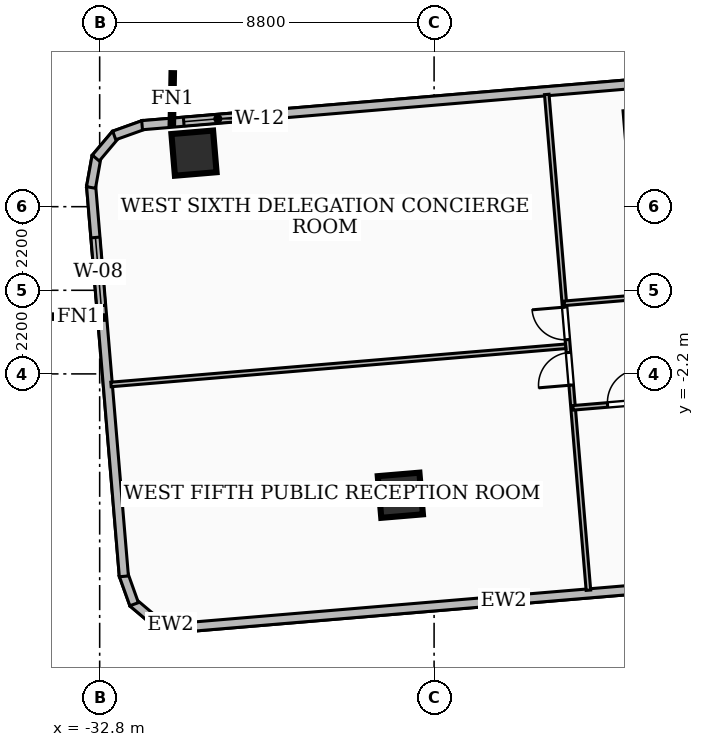
"""IFC4 building model, lengths in metres.
Left out: names, types, materials, properties, quantities, classifications, styles, units other than length and angle.
Written with IfcOpenShell. Run it as: python <this file> out.ifc"""

import sys

from ifc_helpers import new_model, si_unit, direction, frame, frame_2d, origin, origin_2d, place, context, subcontext, project, spatial, rectangle, extrude, element, fill, save


model = new_model("IFC4")
c1 = context("Model", 3, precision=1e-05, world=origin(), true_north=direction((0.0, 1.0)))
c2 = subcontext(c1, "Body", "Model", "MODEL_VIEW")
j1 = project(units=[si_unit("LENGTHUNIT", "METRE"), si_unit("PLANEANGLEUNIT", "RADIAN")], contexts=[c1])
p1 = place(None, origin())
s1 = spatial("IfcSite", under=j1, at=p1, CompositionType="ELEMENT")
p2 = place(p1, origin())
s2 = spatial("IfcBuilding", under=s1, at=p2, CompositionType="ELEMENT")
p3 = place(p2, frame((0.0, 0.0, 64.08)))
s3 = spatial("IfcBuildingStorey", under=s2, at=p3, CompositionType="ELEMENT", Elevation=64.08)
for number, where, z_axis, x_axis in (
    (1, (-30.318, 3.609, 0.0), (0.0, 0.0, 1.0), (0.996, 0.084, 0.0)),
    (2, (-24.888, -5.393, 0.0), (0.0, 0.0, 1.0), (0.996, 0.084, 0.0)),
):
    element("IfcColumn", number, at=place(p3, frame(where, z_axis=z_axis, x_axis=x_axis)), inside=s3, PredefinedType="COLUMN", context=c2, shape_type="SweptSolid", body=[
        extrude(rectangle(XDim=1.1, YDim=1.1, at=origin_2d()), origin(), (0.0, 0.0, 1.0), 3.6),
    ])
p4 = place(p3, frame((-13.758, -7.458, 0.0), z_axis=(0.0, 0.0, 1.0), x_axis=(-0.996498704409, -0.083608205999, 0.0)))
e3 = element("IfcWall", 3, at=p4, inside=s3, PredefinedType="SOLIDWALL", context=c2, shape_type="SweptSolid", body=[
    extrude(rectangle(XDim=16.875, YDim=0.24, at=frame_2d((8.438, 0.0))), origin(), (0.0, 0.0, 1.0), 2.072),
])
p5 = place(p3, frame((-30.524, -8.871, 0.0), z_axis=(0.0, 0.0, 1.0), x_axis=(-0.98444754165, 0.175678791378, 0.0)))
e4 = element("IfcWall", 4, at=p5, inside=s3, PredefinedType="SOLIDWALL", context=c2, shape_type="SweptSolid", body=[
    extrude(rectangle(XDim=0.831, YDim=0.24, at=frame_2d((0.416, 0.0))), origin(), (0.0, 0.0, 1.0), 3.34),
])
p6 = place(p3, frame((-31.298, -8.745, 0.0), z_axis=(0.0, 0.0, 1.0), x_axis=(-0.764000342655, 0.645215837083, 0.0)))
e5 = element("IfcWall", 5, at=p6, inside=s3, PredefinedType="SOLIDWALL", context=c2, shape_type="SweptSolid", body=[
    extrude(rectangle(XDim=0.814, YDim=0.24, at=frame_2d((0.407, 0.0))), origin(), (0.0, 0.0, 1.0), 3.34),
])
p7 = place(p3, frame((-31.893, -8.26, 0.0), z_axis=(0.0, 0.0, 1.0), x_axis=(-0.337136933599, 0.941455621898, 0.0)))
e6 = element("IfcWall", 6, at=p7, inside=s3, PredefinedType="SOLIDWALL", context=c2, shape_type="SweptSolid", body=[
    extrude(rectangle(XDim=0.831, YDim=0.24, at=frame_2d((0.415, 0.0))), origin(), (0.0, 0.0, 1.0), 3.34),
])
p8 = place(p3, frame((-32.163, -7.527, 0.0), z_axis=(0.0, 0.0, 1.0), x_axis=(-0.083619213047, 0.996497780835, 0.0)))
e7 = element("IfcWall", 7, at=p8, inside=s3, PredefinedType="SOLIDWALL", context=c2, shape_type="SweptSolid", body=[
    extrude(rectangle(XDim=10.318, YDim=0.24, at=frame_2d((5.159, 0.0))), origin(), (0.0, 0.0, 1.0), 3.34),
])
p9 = place(p8, frame((7.148, 0.0, 0.85)))
e8 = element("IfcOpeningElement", 8, at=p9, cuts=e7, PredefinedType="OPENING", context=c2, shape_type="SweptSolid", body=[
    extrude(rectangle(XDim=1.8, YDim=1.8, at=frame_2d((0.9, 0.9))), frame((0.0, 0.13, 0.0), z_axis=(0.0, -1.0, 0.0), x_axis=(1.0, 0.0, 0.0)), (0.0, 0.0, 1.0), 0.26),
])
p10 = place(p3, frame((-33.028, 2.705, 0.0), z_axis=(0.0, 0.0, 1.0), x_axis=(0.175729613604, 0.984438470857, 0.0)))
e9 = element("IfcWall", 9, at=p10, inside=s3, PredefinedType="SOLIDWALL", context=c2, shape_type="SweptSolid", body=[
    extrude(rectangle(XDim=0.831, YDim=0.24, at=frame_2d((0.416, 0.0))), origin(), (0.0, 0.0, 1.0), 3.34),
])
p11 = place(p3, frame((-32.902, 3.479, 0.0), z_axis=(0.0, 0.0, 1.0), x_axis=(0.645067994637, 0.764125174494, 0.0)))
e10 = element("IfcWall", 10, at=p11, inside=s3, PredefinedType="SOLIDWALL", context=c2, shape_type="SweptSolid", body=[
    extrude(rectangle(XDim=0.814, YDim=0.24, at=frame_2d((0.407, 0.0))), origin(), (0.0, 0.0, 1.0), 3.34),
])
p12 = place(p3, frame((-32.417, 4.074, 0.0), z_axis=(0.0, 0.0, 1.0), x_axis=(0.941455621898, 0.337136933599, 0.0)))
e11 = element("IfcWall", 11, at=p12, inside=s3, PredefinedType="SOLIDWALL", context=c2, shape_type="SweptSolid", body=[
    extrude(rectangle(XDim=0.831, YDim=0.24, at=frame_2d((0.415, 0.0))), origin(), (0.0, 0.0, 1.0), 3.34),
])
p13 = place(p3, frame((-31.684, 4.344, 0.0), z_axis=(0.0, 0.0, 1.0), x_axis=(0.996492776291, 0.083678831256, 0.0)))
e12 = element("IfcWall", 12, at=p13, inside=s3, PredefinedType="SOLIDWALL", context=c2, shape_type="SweptSolid", body=[
    extrude(rectangle(XDim=16.875, YDim=0.24, at=frame_2d((8.438, 0.0))), origin(), (0.0, 0.0, 1.0), 3.34),
])
p14 = place(p13, frame((1.1, 0.0, 0.85)))
e13 = element("IfcOpeningElement", 13, at=p14, cuts=e12, PredefinedType="OPENING", context=c2, shape_type="SweptSolid", body=[
    extrude(rectangle(XDim=1.8, YDim=1.6, at=frame_2d((0.9, 0.8))), frame((0.0, 0.13, 0.0), z_axis=(0.0, -1.0, 0.0), x_axis=(1.0, 0.0, 0.0)), (0.0, 0.0, 1.0), 0.26),
])
p15 = place(p3, frame((-20.343, -3.093, 0.0), z_axis=(0.0, 0.0, 1.0), x_axis=(0.996496210368, 0.083637926344, 0.0)))
e14 = element("IfcWall", 14, at=p15, inside=s3, PredefinedType="PARTITIONING", context=c2, shape_type="SweptSolid", body=[
    extrude(rectangle(XDim=6.241, YDim=0.12, at=frame_2d((3.121, 0.0))), origin(), (0.0, 0.0, 1.0), 2.152),
])
p16 = place(p15, frame((4.031, 0.0, 0.0)))
e15 = element("IfcOpeningElement", 15, at=p16, cuts=e14, PredefinedType="OPENING", context=c2, shape_type="SweptSolid", body=[
    extrude(rectangle(XDim=0.86, YDim=2.04, at=frame_2d((0.43, 1.02))), frame((0.0, 0.07, 0.0), z_axis=(0.0, -1.0, 0.0), x_axis=(1.0, 0.0, 0.0)), (0.0, 0.0, 1.0), 0.14),
])
p17 = place(p15, frame((0.911, 0.0, 0.0)))
e16 = element("IfcOpeningElement", 16, at=p17, cuts=e14, PredefinedType="OPENING", context=c2, shape_type="SweptSolid", body=[
    extrude(rectangle(XDim=0.86, YDim=2.04, at=frame_2d((0.43, 1.02))), frame((0.0, 0.07, 0.0), z_axis=(0.0, -1.0, 0.0), x_axis=(1.0, 0.0, 0.0)), (0.0, 0.0, 1.0), 0.14),
])
p18 = place(p3, frame((-14.355, 0.179, 0.0), z_axis=(0.0, 0.0, 1.0), x_axis=(-0.996495115495, -0.083650970078, 0.0)))
e17 = element("IfcWall", 17, at=p18, inside=s3, PredefinedType="PARTITIONING", context=c2, shape_type="SweptSolid", body=[
    extrude(rectangle(XDim=6.24, YDim=0.12, at=frame_2d((3.12, 0.0))), origin(), (0.0, 0.0, 1.0), 2.152),
])
p19 = place(p18, frame((2.64, 0.0, 0.0)))
e18 = element("IfcOpeningElement", 18, at=p19, cuts=e17, PredefinedType="OPENING", context=c2, shape_type="SweptSolid", body=[
    extrude(rectangle(XDim=0.9, YDim=2.06, at=frame_2d((0.45, 1.03))), frame((0.0, 0.07, 0.0), z_axis=(0.0, -1.0, 0.0), x_axis=(1.0, 0.0, 0.0)), (0.0, 0.0, 1.0), 0.14),
])
p20 = place(p3, frame((-20.539, -1.474, 0.0), z_axis=(0.0, 0.0, 1.0), x_axis=(-0.996497343043, -0.083624430094, 0.0)))
e19 = element("IfcWall", 19, at=p20, inside=s3, PredefinedType="PARTITIONING", context=c2, shape_type="SweptSolid", body=[
    extrude(rectangle(XDim=12.005, YDim=0.12, at=frame_2d((6.002, 0.0))), origin(), (0.0, 0.0, 1.0), 2.152),
])
p21 = place(p3, frame((-19.939, -7.891, 0.0), z_axis=(0.0, 0.0, 1.0), x_axis=(-0.083723060433, 0.99648906123, 0.0)))
e20 = element("IfcWall", 20, at=p21, inside=s3, PredefinedType="PARTITIONING", context=c2, shape_type="SweptSolid", body=[
    extrude(rectangle(XDim=13.09, YDim=0.12, at=frame_2d((6.545, 0.0))), origin(), (0.0, 0.0, 1.0), 2.152),
])
p22 = place(p21, frame((6.615, 0.0, 0.0)))
e21 = element("IfcOpeningElement", 21, at=p22, cuts=e20, PredefinedType="OPENING", context=c2, shape_type="SweptSolid", body=[
    extrude(rectangle(XDim=0.86, YDim=2.04, at=frame_2d((0.43, 1.02))), frame((0.0, 0.07, 0.0), z_axis=(0.0, -1.0, 0.0), x_axis=(1.0, 0.0, 0.0)), (0.0, 0.0, 1.0), 0.14),
])
p23 = place(p21, frame((5.415, 0.0, 0.0)))
e22 = element("IfcOpeningElement", 22, at=p23, cuts=e20, PredefinedType="OPENING", context=c2, shape_type="SweptSolid", body=[
    extrude(rectangle(XDim=0.86, YDim=2.04, at=frame_2d((0.43, 1.02))), frame((0.0, 0.07, 0.0), z_axis=(0.0, -1.0, 0.0), x_axis=(1.0, 0.0, 0.0)), (0.0, 0.0, 1.0), 0.14),
])
p24 = place(p9, origin())
e23 = element("IfcWindow", 23, at=p24, inside=s3, PartitioningType="SINGLE_PANEL", PredefinedType="WINDOW", context=c2, shape_type="SweptSolid", body=[
    extrude(rectangle(XDim=1.8, YDim=1.8, at=frame_2d((0.9, 0.9))), frame((0.0, 0.03, 0.0), z_axis=(0.0, -1.0, 0.0), x_axis=(1.0, 0.0, 0.0)), (0.0, 0.0, 1.0), 0.06),
])
fill(e8, e23)
p25 = place(p14, origin())
e24 = element("IfcWindow", 24, at=p25, inside=s3, PartitioningType="SINGLE_PANEL", PredefinedType="WINDOW", context=c2, shape_type="SweptSolid", body=[
    extrude(rectangle(XDim=1.8, YDim=1.6, at=frame_2d((0.9, 0.8))), frame((0.0, 0.03, 0.0), z_axis=(0.0, -1.0, 0.0), x_axis=(1.0, 0.0, 0.0)), (0.0, 0.0, 1.0), 0.06),
])
fill(e13, e24)
p26 = place(p17, origin())
e25 = element("IfcDoor", 25, at=p26, inside=s3, OperationType="SINGLE_SWING_RIGHT", PredefinedType="DOOR", context=c2, shape_type="SweptSolid", body=[
    extrude(rectangle(XDim=0.86, YDim=2.04, at=frame_2d((0.43, 1.02))), frame((0.0, 0.025, 0.0), z_axis=(0.0, -1.0, 0.0), x_axis=(1.0, 0.0, 0.0)), (0.0, 0.0, 1.0), 0.05),
])
fill(e16, e25)
p27 = place(p22, origin())
e26 = element("IfcDoor", 26, at=p27, inside=s3, OperationType="SINGLE_SWING_RIGHT", PredefinedType="DOOR", context=c2, shape_type="SweptSolid", body=[
    extrude(rectangle(XDim=0.86, YDim=2.04, at=frame_2d((0.43, 1.02))), frame((0.0, 0.025, 0.0), z_axis=(0.0, -1.0, 0.0), x_axis=(1.0, 0.0, 0.0)), (0.0, 0.0, 1.0), 0.05),
])
fill(e21, e26)
p28 = place(p23, origin())
e27 = element("IfcDoor", 27, at=p28, inside=s3, OperationType="SINGLE_SWING_LEFT", PredefinedType="DOOR", context=c2, shape_type="SweptSolid", body=[
    extrude(rectangle(XDim=0.86, YDim=2.04, at=frame_2d((0.43, 1.02))), frame((0.0, 0.025, 0.0), z_axis=(0.0, -1.0, 0.0), x_axis=(1.0, 0.0, 0.0)), (0.0, 0.0, 1.0), 0.05),
])
fill(e22, e27)
save(model, sys.argv[1])
